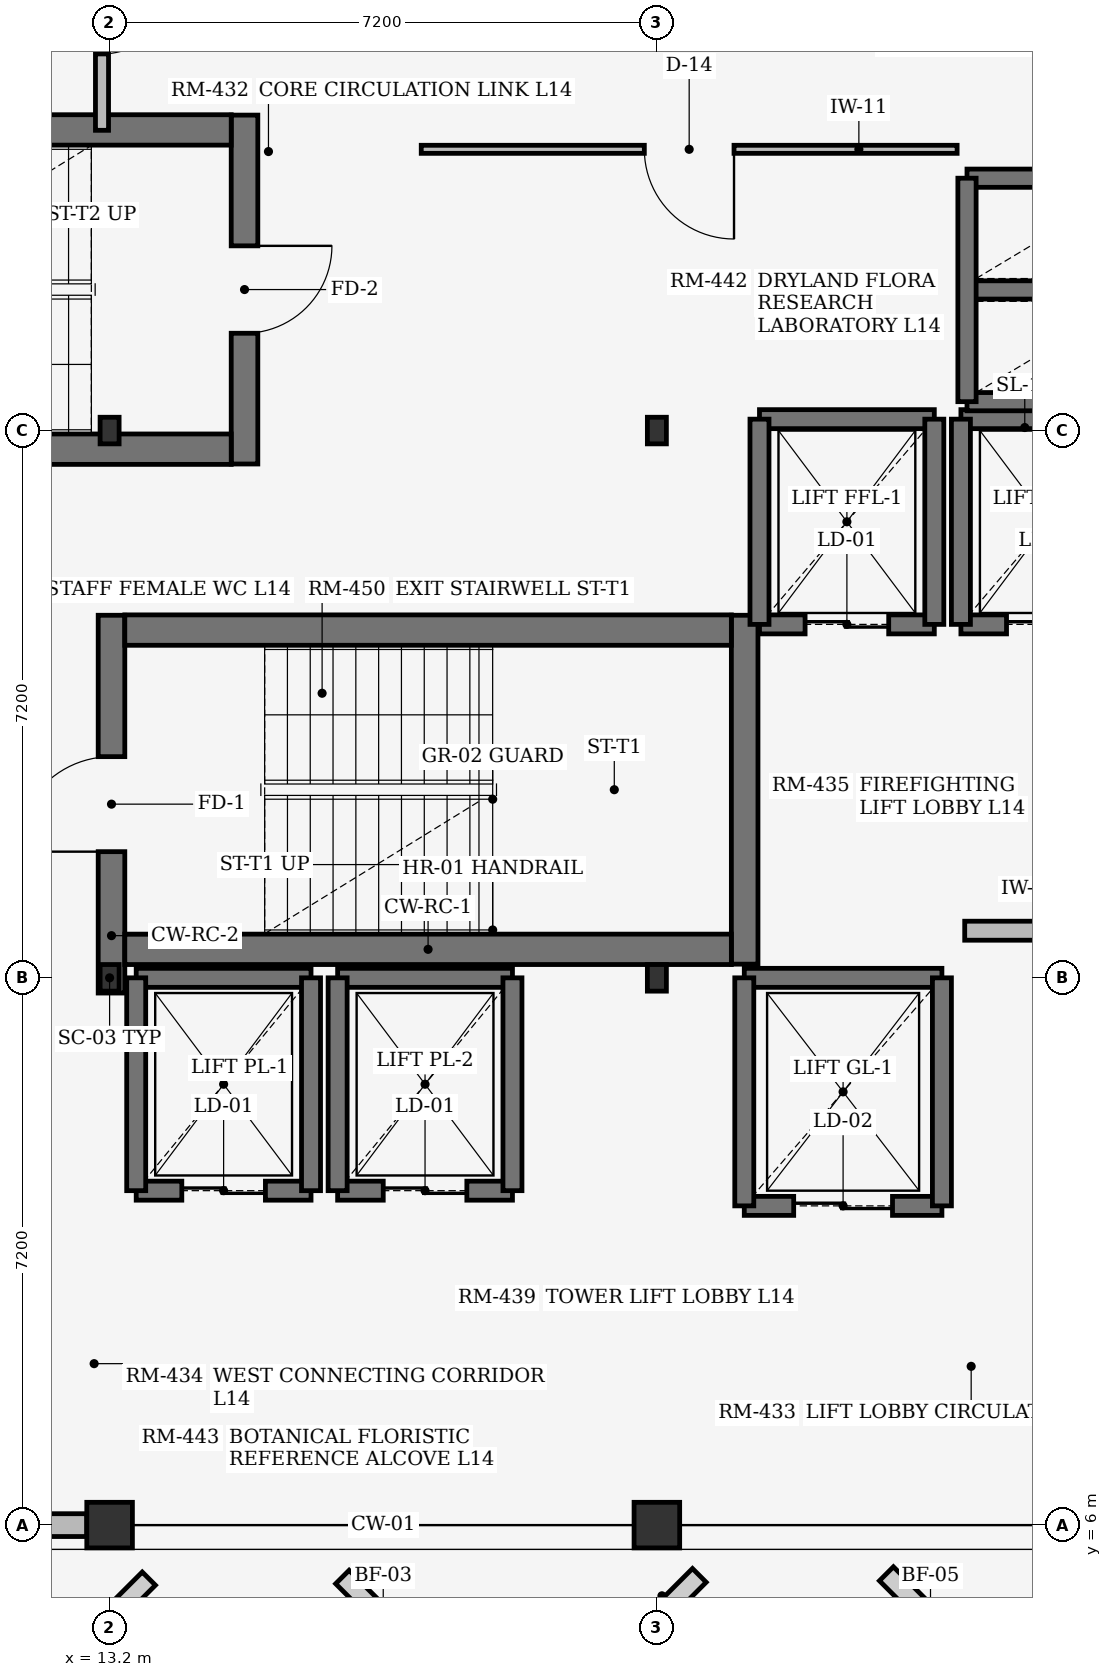
"""IFC4 building model, lengths in metres.
Left out: names, types, materials, properties, quantities, classifications, styles, units other than length and angle.
Written with IfcOpenShell. Run it as: python <this file> out.ifc"""

import sys

from ifc_helpers import new_model, si_unit, direction, frame, frame_2d, origin, origin_2d, place, context, subcontext, project, spatial, rectangle, i_section, extrude, element, fill, save


model = new_model("IFC4")
c1 = context("Model", 3, precision=1e-05, world=origin(), true_north=direction((0.0, 1.0)))
c2 = subcontext(c1, "Body", "Model", "MODEL_VIEW")
j1 = project(units=[si_unit("LENGTHUNIT", "METRE"), si_unit("PLANEANGLEUNIT", "RADIAN")], contexts=[c1])
p1 = place(None, origin())
s1 = spatial("IfcSite", under=j1, at=p1, CompositionType="ELEMENT")
p2 = place(p1, origin())
s2 = spatial("IfcBuilding", under=s1, at=p2, CompositionType="ELEMENT")
p3 = place(p2, frame((0.0, 0.0, 56.1)))
s3 = spatial("IfcBuildingStorey", under=s2, at=p3, CompositionType="ELEMENT", Elevation=56.1)
p4 = place(p3, frame((13.2, 6.0, 0.0), z_axis=(0.0, 0.0, 1.0), x_axis=(1.0, 0.0, 0.0)))
e1 = element("IfcColumn", 1, at=p4, inside=s3, PredefinedType="COLUMN", context=c2, shape_type="SweptSolid", body=[
    extrude(rectangle(XDim=0.6, YDim=0.6, at=origin_2d()), origin(), (0.0, 0.0, 1.0), 3.088),
])
for number, where, z_axis, x_axis in (
    (2, (13.2, 13.2, 0.0), (0.0, 0.0, 1.0), (1.0, 0.0, 0.0)),
    (3, (13.2, 20.4, 0.0), (0.0, 0.0, 1.0), (1.0, 0.0, 0.0)),
):
    element("IfcColumn", number, at=place(p3, frame(where, z_axis=z_axis, x_axis=x_axis)), inside=s3, PredefinedType="COLUMN", context=c2, shape_type="SweptSolid", body=[
        extrude(i_section(OverallWidth=0.25, OverallDepth=0.35, WebThickness=0.01, FlangeThickness=0.012, at=origin_2d()), origin(), (0.0, 0.0, 1.0), 3.088),
    ])
p5 = place(p3, frame((20.4, 6.0, 0.0), z_axis=(0.0, 0.0, 1.0), x_axis=(1.0, 0.0, 0.0)))
e4 = element("IfcColumn", 4, at=p5, inside=s3, PredefinedType="COLUMN", context=c2, shape_type="SweptSolid", body=[
    extrude(rectangle(XDim=0.6, YDim=0.6, at=origin_2d()), origin(), (0.0, 0.0, 1.0), 3.088),
])
for number, where, z_axis, x_axis in (
    (5, (20.4, 13.2, 0.0), (0.0, 0.0, 1.0), (1.0, 0.0, 0.0)),
    (6, (20.4, 20.4, 0.0), (0.0, 0.0, 1.0), (1.0, 0.0, 0.0)),
):
    element("IfcColumn", number, at=place(p3, frame(where, z_axis=z_axis, x_axis=x_axis)), inside=s3, PredefinedType="COLUMN", context=c2, shape_type="SweptSolid", body=[
        extrude(i_section(OverallWidth=0.25, OverallDepth=0.35, WebThickness=0.01, FlangeThickness=0.012, at=origin_2d()), origin(), (0.0, 0.0, 1.0), 3.088),
    ])
p6 = place(p3, frame((6.3, 6.0, 0.0), z_axis=(0.0, 0.0, 1.0), x_axis=(1.0, 0.0, 0.0)))
e7 = element("IfcWall", 7, at=p6, inside=s3, PredefinedType="STANDARD", context=c2, shape_type="SweptSolid", body=[
    extrude(rectangle(XDim=6.6, YDim=0.3, at=frame_2d((3.3, 0.0))), origin(), (0.0, 0.0, 1.0), 2.695),
])
p7 = place(p6, frame((2.625, 0.0, 0.75)))
e8 = element("IfcOpeningElement", 8, at=p7, cuts=e7, PredefinedType="OPENING", context=c2, shape_type="SweptSolid", body=[
    extrude(rectangle(XDim=1.35, YDim=1.5, at=frame_2d((0.675, 0.75))), frame((0.0, 0.16, 0.0), z_axis=(0.0, -1.0, 0.0), x_axis=(1.0, 0.0, 0.0)), (0.0, 0.0, 1.0), 0.32),
])
p8 = place(p3, frame((13.225, 13.0, 0.0), z_axis=(0.0, 0.0, 1.0), x_axis=(0.0, 1.0, 0.0)))
e9 = element("IfcWall", 9, at=p8, inside=s3, PredefinedType="SHEAR", context=c2, shape_type="SweptSolid", body=[
    extrude(rectangle(XDim=4.97, YDim=0.35, at=frame_2d((2.485, 0.0))), origin(), (0.0, 0.0, 1.0), 3.115),
])
p9 = place(p8, frame((1.86, 0.0, 0.0)))
e10 = element("IfcOpeningElement", 10, at=p9, cuts=e9, PredefinedType="OPENING", context=c2, shape_type="SweptSolid", body=[
    extrude(rectangle(XDim=1.25, YDim=2.2, at=frame_2d((0.625, 1.1))), frame((0.0, 0.185, 0.0), z_axis=(0.0, -1.0, 0.0), x_axis=(1.0, 0.0, 0.0)), (0.0, 0.0, 1.0), 0.37),
])
p10 = place(p3, frame((21.555, 13.38, 0.0), z_axis=(0.0, 0.0, 1.0), x_axis=(0.0, 1.0, 0.0)))
e11 = element("IfcWall", 11, at=p10, inside=s3, PredefinedType="SHEAR", context=c2, shape_type="SweptSolid", body=[
    extrude(rectangle(XDim=4.59, YDim=0.35, at=frame_2d((2.295, 0.0))), origin(), (0.0, 0.0, 1.0), 3.115),
])
for number, where, z_axis, x_axis in (
    (12, (13.4, 13.575, 0.0), (0.0, 0.0, 1.0), (1.0, 0.0, 0.0)),
    (13, (13.4, 17.775, 0.0), (0.0, 0.0, 1.0), (1.0, 0.0, 0.0)),
):
    element("IfcWall", number, at=place(p3, frame(where, z_axis=z_axis, x_axis=x_axis)), inside=s3, PredefinedType="SHEAR", context=c2, shape_type="SweptSolid", body=[
        extrude(rectangle(XDim=7.98, YDim=0.4, at=frame_2d((3.99, 0.0))), origin(), (0.0, 0.0, 1.0), 3.115),
    ])
p11 = place(p3, frame((14.975, 24.55, 0.0), z_axis=(0.0, 0.0, 1.0), x_axis=(0.0, -1.0, 0.0)))
e14 = element("IfcWall", 14, at=p11, inside=s3, PredefinedType="SHEAR", context=c2, shape_type="SweptSolid", body=[
    extrude(rectangle(XDim=4.59, YDim=0.35, at=frame_2d((2.295, 0.0))), origin(), (0.0, 0.0, 1.0), 3.115),
])
p12 = place(p11, frame((1.72, 0.0, 0.0)))
e15 = element("IfcOpeningElement", 15, at=p12, cuts=e14, PredefinedType="OPENING", context=c2, shape_type="SweptSolid", body=[
    extrude(rectangle(XDim=1.15, YDim=2.2, at=frame_2d((0.575, 1.1))), frame((0.0, 0.185, 0.0), z_axis=(0.0, -1.0, 0.0), x_axis=(1.0, 0.0, 0.0)), (0.0, 0.0, 1.0), 0.37),
])
for number, where, z_axis, x_axis in (
    (16, (14.8, 24.355, 0.0), (0.0, 0.0, 1.0), (-1.0, 0.0, 0.0)),
    (17, (14.8, 20.155, 0.0), (0.0, 0.0, 1.0), (-1.0, 0.0, 0.0)),
):
    element("IfcWall", number, at=place(p3, frame(where, z_axis=z_axis, x_axis=x_axis)), inside=s3, PredefinedType="SHEAR", context=c2, shape_type="SweptSolid", body=[
        extrude(rectangle(XDim=7.98, YDim=0.4, at=frame_2d((3.99, 0.0))), origin(), (0.0, 0.0, 1.0), 3.115),
    ])
p13 = place(p3, frame((21.75, 17.85, 0.0), z_axis=(0.0, 0.0, 1.0), x_axis=(1.0, 0.0, 0.0)))
e18 = element("IfcWall", 18, at=p13, inside=s3, PredefinedType="SHEAR", context=c2, shape_type="SweptSolid", body=[
    extrude(rectangle(XDim=2.3, YDim=0.25, at=frame_2d((1.15, 0.0))), origin(), (0.0, 0.0, 1.0), 3.115),
])
p14 = place(p13, frame((0.6, 0.0, 0.0)))
e19 = element("IfcOpeningElement", 19, at=p14, cuts=e18, PredefinedType="OPENING", context=c2, shape_type="SweptSolid", body=[
    extrude(rectangle(XDim=1.1, YDim=2.2, at=frame_2d((0.55, 1.1))), frame((0.0, 0.135, 0.0), z_axis=(0.0, -1.0, 0.0), x_axis=(1.0, 0.0, 0.0)), (0.0, 0.0, 1.0), 0.27),
])
p15 = place(p3, frame((21.75, 20.55, 0.0), z_axis=(0.0, 0.0, 1.0), x_axis=(1.0, 0.0, 0.0)))
e20 = element("IfcWall", 20, at=p15, inside=s3, PredefinedType="SHEAR", context=c2, shape_type="SweptSolid", body=[
    extrude(rectangle(XDim=2.3, YDim=0.25, at=frame_2d((1.15, 0.0))), origin(), (0.0, 0.0, 1.0), 3.115),
])
for number, where, z_axis, x_axis in (
    (21, (21.75, 17.85, 0.0), (0.0, 0.0, 1.0), (0.0, 1.0, 0.0)),
    (22, (24.05, 17.85, 0.0), (0.0, 0.0, 1.0), (0.0, 1.0, 0.0)),
):
    element("IfcWall", number, at=place(p3, frame(where, z_axis=z_axis, x_axis=x_axis)), inside=s3, PredefinedType="SHEAR", context=c2, shape_type="SweptSolid", body=[
        extrude(rectangle(XDim=2.7, YDim=0.25, at=frame_2d((1.35, 0.0))), origin(), (0.0, 0.0, 1.0), 3.115),
    ])
p16 = place(p3, frame((24.4, 17.85, 0.0), z_axis=(0.0, 0.0, 1.0), x_axis=(1.0, 0.0, 0.0)))
e23 = element("IfcWall", 23, at=p16, inside=s3, PredefinedType="SHEAR", context=c2, shape_type="SweptSolid", body=[
    extrude(rectangle(XDim=2.3, YDim=0.25, at=frame_2d((1.15, 0.0))), origin(), (0.0, 0.0, 1.0), 3.115),
])
p17 = place(p16, frame((0.6, 0.0, 0.0)))
e24 = element("IfcOpeningElement", 24, at=p17, cuts=e23, PredefinedType="OPENING", context=c2, shape_type="SweptSolid", body=[
    extrude(rectangle(XDim=1.1, YDim=2.2, at=frame_2d((0.55, 1.1))), frame((0.0, 0.135, 0.0), z_axis=(0.0, -1.0, 0.0), x_axis=(1.0, 0.0, 0.0)), (0.0, 0.0, 1.0), 0.27),
])
p18 = place(p3, frame((24.4, 20.55, 0.0), z_axis=(0.0, 0.0, 1.0), x_axis=(1.0, 0.0, 0.0)))
e25 = element("IfcWall", 25, at=p18, inside=s3, PredefinedType="SHEAR", context=c2, shape_type="SweptSolid", body=[
    extrude(rectangle(XDim=2.3, YDim=0.25, at=frame_2d((1.15, 0.0))), origin(), (0.0, 0.0, 1.0), 3.115),
])
p19 = place(p3, frame((24.4, 17.85, 0.0), z_axis=(0.0, 0.0, 1.0), x_axis=(0.0, 1.0, 0.0)))
e26 = element("IfcWall", 26, at=p19, inside=s3, PredefinedType="SHEAR", context=c2, shape_type="SweptSolid", body=[
    extrude(rectangle(XDim=2.7, YDim=0.25, at=frame_2d((1.35, 0.0))), origin(), (0.0, 0.0, 1.0), 3.115),
])
p20 = place(p3, frame((13.55, 10.4, 0.0), z_axis=(0.0, 0.0, 1.0), x_axis=(1.0, 0.0, 0.0)))
e27 = element("IfcWall", 27, at=p20, inside=s3, PredefinedType="SHEAR", context=c2, shape_type="SweptSolid", body=[
    extrude(rectangle(XDim=2.3, YDim=0.25, at=frame_2d((1.15, 0.0))), origin(), (0.0, 0.0, 1.0), 3.115),
])
p21 = place(p20, frame((0.6, 0.0, 0.0)))
e28 = element("IfcOpeningElement", 28, at=p21, cuts=e27, PredefinedType="OPENING", context=c2, shape_type="SweptSolid", body=[
    extrude(rectangle(XDim=1.1, YDim=2.2, at=frame_2d((0.55, 1.1))), frame((0.0, 0.135, 0.0), z_axis=(0.0, -1.0, 0.0), x_axis=(1.0, 0.0, 0.0)), (0.0, 0.0, 1.0), 0.27),
])
p22 = place(p3, frame((13.55, 13.2, 0.0), z_axis=(0.0, 0.0, 1.0), x_axis=(1.0, 0.0, 0.0)))
e29 = element("IfcWall", 29, at=p22, inside=s3, PredefinedType="SHEAR", context=c2, shape_type="SweptSolid", body=[
    extrude(rectangle(XDim=2.3, YDim=0.25, at=frame_2d((1.15, 0.0))), origin(), (0.0, 0.0, 1.0), 3.115),
])
for number, where, z_axis, x_axis in (
    (30, (13.55, 10.4, 0.0), (0.0, 0.0, 1.0), (0.0, 1.0, 0.0)),
    (31, (15.85, 10.4, 0.0), (0.0, 0.0, 1.0), (0.0, 1.0, 0.0)),
):
    element("IfcWall", number, at=place(p3, frame(where, z_axis=z_axis, x_axis=x_axis)), inside=s3, PredefinedType="SHEAR", context=c2, shape_type="SweptSolid", body=[
        extrude(rectangle(XDim=2.8, YDim=0.25, at=frame_2d((1.4, 0.0))), origin(), (0.0, 0.0, 1.0), 3.115),
    ])
p23 = place(p3, frame((16.2, 10.4, 0.0), z_axis=(0.0, 0.0, 1.0), x_axis=(1.0, 0.0, 0.0)))
e32 = element("IfcWall", 32, at=p23, inside=s3, PredefinedType="SHEAR", context=c2, shape_type="SweptSolid", body=[
    extrude(rectangle(XDim=2.3, YDim=0.25, at=frame_2d((1.15, 0.0))), origin(), (0.0, 0.0, 1.0), 3.115),
])
p24 = place(p23, frame((0.6, 0.0, 0.0)))
e33 = element("IfcOpeningElement", 33, at=p24, cuts=e32, PredefinedType="OPENING", context=c2, shape_type="SweptSolid", body=[
    extrude(rectangle(XDim=1.1, YDim=2.2, at=frame_2d((0.55, 1.1))), frame((0.0, 0.135, 0.0), z_axis=(0.0, -1.0, 0.0), x_axis=(1.0, 0.0, 0.0)), (0.0, 0.0, 1.0), 0.27),
])
p25 = place(p3, frame((16.2, 13.2, 0.0), z_axis=(0.0, 0.0, 1.0), x_axis=(1.0, 0.0, 0.0)))
e34 = element("IfcWall", 34, at=p25, inside=s3, PredefinedType="SHEAR", context=c2, shape_type="SweptSolid", body=[
    extrude(rectangle(XDim=2.3, YDim=0.25, at=frame_2d((1.15, 0.0))), origin(), (0.0, 0.0, 1.0), 3.115),
])
for number, where, z_axis, x_axis in (
    (35, (16.2, 10.4, 0.0), (0.0, 0.0, 1.0), (0.0, 1.0, 0.0)),
    (36, (18.5, 10.4, 0.0), (0.0, 0.0, 1.0), (0.0, 1.0, 0.0)),
):
    element("IfcWall", number, at=place(p3, frame(where, z_axis=z_axis, x_axis=x_axis)), inside=s3, PredefinedType="SHEAR", context=c2, shape_type="SweptSolid", body=[
        extrude(rectangle(XDim=2.8, YDim=0.25, at=frame_2d((1.4, 0.0))), origin(), (0.0, 0.0, 1.0), 3.115),
    ])
p26 = place(p3, frame((21.55, 10.2, 0.0), z_axis=(0.0, 0.0, 1.0), x_axis=(1.0, 0.0, 0.0)))
e37 = element("IfcWall", 37, at=p26, inside=s3, PredefinedType="SHEAR", context=c2, shape_type="SweptSolid", body=[
    extrude(rectangle(XDim=2.6, YDim=0.25, at=frame_2d((1.3, 0.0))), origin(), (0.0, 0.0, 1.0), 3.115),
])
p27 = place(p26, frame((0.65, 0.0, 0.0)))
e38 = element("IfcOpeningElement", 38, at=p27, cuts=e37, PredefinedType="OPENING", context=c2, shape_type="SweptSolid", body=[
    extrude(rectangle(XDim=1.3, YDim=2.25, at=frame_2d((0.65, 1.125))), frame((0.0, 0.135, 0.0), z_axis=(0.0, -1.0, 0.0), x_axis=(1.0, 0.0, 0.0)), (0.0, 0.0, 1.0), 0.27),
])
p28 = place(p3, frame((21.55, 13.2, 0.0), z_axis=(0.0, 0.0, 1.0), x_axis=(1.0, 0.0, 0.0)))
e39 = element("IfcWall", 39, at=p28, inside=s3, PredefinedType="SHEAR", context=c2, shape_type="SweptSolid", body=[
    extrude(rectangle(XDim=2.6, YDim=0.25, at=frame_2d((1.3, 0.0))), origin(), (0.0, 0.0, 1.0), 3.115),
])
for number, where, z_axis, x_axis in (
    (40, (21.55, 10.2, 0.0), (0.0, 0.0, 1.0), (0.0, 1.0, 0.0)),
    (41, (24.15, 10.2, 0.0), (0.0, 0.0, 1.0), (0.0, 1.0, 0.0)),
):
    element("IfcWall", number, at=place(p3, frame(where, z_axis=z_axis, x_axis=x_axis)), inside=s3, PredefinedType="SHEAR", context=c2, shape_type="SweptSolid", body=[
        extrude(rectangle(XDim=3.0, YDim=0.25, at=frame_2d((1.5, 0.0))), origin(), (0.0, 0.0, 1.0), 3.115),
    ])
for number, where, z_axis, x_axis in (
    (42, (24.48, 20.78, 0.0), (0.0, 0.0, 1.0), (1.0, 0.0, 0.0)),
    (43, (24.48, 22.25, 0.0), (0.0, 0.0, 1.0), (1.0, 0.0, 0.0)),
    (44, (24.48, 23.72, 0.0), (0.0, 0.0, 1.0), (1.0, 0.0, 0.0)),
):
    element("IfcWall", number, at=place(p3, frame(where, z_axis=z_axis, x_axis=x_axis)), inside=s3, PredefinedType="SHEAR", context=c2, shape_type="SweptSolid", body=[
        extrude(rectangle(XDim=2.24, YDim=0.24, at=frame_2d((1.12, 0.0))), origin(), (0.0, 0.0, 1.0), 3.115),
    ])
p29 = place(p3, frame((24.48, 20.78, 0.0), z_axis=(0.0, 0.0, 1.0), x_axis=(0.0, 1.0, 0.0)))
e45 = element("IfcWall", 45, at=p29, inside=s3, PredefinedType="SHEAR", context=c2, shape_type="SweptSolid", body=[
    extrude(rectangle(XDim=2.94, YDim=0.24, at=frame_2d((1.47, 0.0))), origin(), (0.0, 0.0, 1.0), 3.115),
])
p30 = place(p3, frame((24.45, 13.82, 0.0), z_axis=(0.0, 0.0, 1.0), x_axis=(1.0, 0.0, 0.0)))
e46 = element("IfcWall", 46, at=p30, inside=s3, PredefinedType="SOLIDWALL", context=c2, shape_type="SweptSolid", body=[
    extrude(rectangle(XDim=2.0, YDim=0.25, at=frame_2d((1.0, 0.0))), origin(), (0.0, 0.0, 1.0), 3.095),
])
p31 = place(p3, frame((17.3, 24.1, 0.0), z_axis=(0.0, 0.0, 1.0), x_axis=(1.0, 0.0, 0.0)))
e47 = element("IfcWall", 47, at=p31, inside=s3, PredefinedType="PARTITIONING", context=c2, shape_type="SweptSolid", body=[
    extrude(rectangle(XDim=7.05, YDim=0.106, at=frame_2d((3.525, 0.0))), origin(), (0.0, 0.0, 1.0), 3.095),
])
p32 = place(p31, frame((2.935, 0.0, 0.0)))
e48 = element("IfcOpeningElement", 48, at=p32, cuts=e47, PredefinedType="OPENING", context=c2, shape_type="SweptSolid", body=[
    extrude(rectangle(XDim=1.18, YDim=2.1, at=frame_2d((0.59, 1.05))), frame((0.0, 0.063, 0.0), z_axis=(0.0, -1.0, 0.0), x_axis=(1.0, 0.0, 0.0)), (0.0, 0.0, 1.0), 0.126),
])
p33 = place(p3, frame((13.1, 24.35, 0.0), z_axis=(0.0, 0.0, 1.0), x_axis=(0.0, 1.0, 0.0)))
e49 = element("IfcWall", 49, at=p33, inside=s3, PredefinedType="PARTITIONING", context=c2, shape_type="SweptSolid", body=[
    extrude(rectangle(XDim=2.95, YDim=0.172, at=frame_2d((1.475, 0.0))), origin(), (0.0, 0.0, 1.0), 2.678),
])
p34 = place(p33, frame((1.005, 0.0, 0.0)))
e50 = element("IfcOpeningElement", 50, at=p34, cuts=e49, PredefinedType="OPENING", context=c2, shape_type="SweptSolid", body=[
    extrude(rectangle(XDim=0.94, YDim=2.18, at=frame_2d((0.47, 1.09))), frame((0.0, 0.096, 0.0), z_axis=(0.0, -1.0, 0.0), x_axis=(1.0, 0.0, 0.0)), (0.0, 0.0, 1.0), 0.192),
])
p35 = place(p9, origin())
e51 = element("IfcDoor", 51, at=p35, inside=s3, OperationType="SINGLE_SWING_LEFT", PredefinedType="DOOR", context=c2, shape_type="SweptSolid", body=[
    extrude(rectangle(XDim=1.25, YDim=2.2, at=frame_2d((0.625, 1.1))), frame((0.0, 0.025, 0.0), z_axis=(0.0, -1.0, 0.0), x_axis=(1.0, 0.0, 0.0)), (0.0, 0.0, 1.0), 0.05),
])
fill(e10, e51)
p36 = place(p12, origin())
e52 = element("IfcDoor", 52, at=p36, inside=s3, OperationType="SINGLE_SWING_LEFT", PredefinedType="DOOR", context=c2, shape_type="SweptSolid", body=[
    extrude(rectangle(XDim=1.15, YDim=2.2, at=frame_2d((0.575, 1.1))), frame((0.0, 0.025, 0.0), z_axis=(0.0, -1.0, 0.0), x_axis=(1.0, 0.0, 0.0)), (0.0, 0.0, 1.0), 0.05),
])
fill(e15, e52)
p37 = place(p14, origin())
e53 = element("IfcDoor", 53, at=p37, inside=s3, OperationType="DOUBLE_DOOR_SLIDING", PredefinedType="DOOR", context=c2, shape_type="SweptSolid", body=[
    extrude(rectangle(XDim=1.1, YDim=2.2, at=frame_2d((0.55, 1.1))), frame((0.0, 0.025, 0.0), z_axis=(0.0, -1.0, 0.0), x_axis=(1.0, 0.0, 0.0)), (0.0, 0.0, 1.0), 0.05),
])
fill(e19, e53)
p38 = place(p17, origin())
e54 = element("IfcDoor", 54, at=p38, inside=s3, OperationType="DOUBLE_DOOR_SLIDING", PredefinedType="DOOR", context=c2, shape_type="SweptSolid", body=[
    extrude(rectangle(XDim=1.1, YDim=2.2, at=frame_2d((0.55, 1.1))), frame((0.0, 0.025, 0.0), z_axis=(0.0, -1.0, 0.0), x_axis=(1.0, 0.0, 0.0)), (0.0, 0.0, 1.0), 0.05),
])
fill(e24, e54)
p39 = place(p21, origin())
e55 = element("IfcDoor", 55, at=p39, inside=s3, OperationType="DOUBLE_DOOR_SLIDING", PredefinedType="DOOR", context=c2, shape_type="SweptSolid", body=[
    extrude(rectangle(XDim=1.1, YDim=2.2, at=frame_2d((0.55, 1.1))), frame((0.0, 0.025, 0.0), z_axis=(0.0, -1.0, 0.0), x_axis=(1.0, 0.0, 0.0)), (0.0, 0.0, 1.0), 0.05),
])
fill(e28, e55)
p40 = place(p24, origin())
e56 = element("IfcDoor", 56, at=p40, inside=s3, OperationType="DOUBLE_DOOR_SLIDING", PredefinedType="DOOR", context=c2, shape_type="SweptSolid", body=[
    extrude(rectangle(XDim=1.1, YDim=2.2, at=frame_2d((0.55, 1.1))), frame((0.0, 0.025, 0.0), z_axis=(0.0, -1.0, 0.0), x_axis=(1.0, 0.0, 0.0)), (0.0, 0.0, 1.0), 0.05),
])
fill(e33, e56)
p41 = place(p27, origin())
e57 = element("IfcDoor", 57, at=p41, inside=s3, OperationType="DOUBLE_DOOR_SLIDING", PredefinedType="DOOR", context=c2, shape_type="SweptSolid", body=[
    extrude(rectangle(XDim=1.3, YDim=2.25, at=frame_2d((0.65, 1.125))), frame((0.0, 0.025, 0.0), z_axis=(0.0, -1.0, 0.0), x_axis=(1.0, 0.0, 0.0)), (0.0, 0.0, 1.0), 0.05),
])
fill(e38, e57)
p42 = place(p32, origin())
e58 = element("IfcDoor", 58, at=p42, inside=s3, OperationType="SINGLE_SWING_RIGHT", PredefinedType="DOOR", context=c2, shape_type="SweptSolid", body=[
    extrude(rectangle(XDim=1.18, YDim=2.1, at=frame_2d((0.59, 1.05))), frame((0.0, 0.025, 0.0), z_axis=(0.0, -1.0, 0.0), x_axis=(1.0, 0.0, 0.0)), (0.0, 0.0, 1.0), 0.05),
])
fill(e48, e58)
p43 = place(p34, origin())
e59 = element("IfcDoor", 59, at=p43, inside=s3, OperationType="SINGLE_SWING_RIGHT", PredefinedType="DOOR", context=c2, shape_type="SweptSolid", body=[
    extrude(rectangle(XDim=0.94, YDim=2.18, at=frame_2d((0.47, 1.09))), frame((0.0, 0.025, 0.0), z_axis=(0.0, -1.0, 0.0), x_axis=(1.0, 0.0, 0.0)), (0.0, 0.0, 1.0), 0.05),
])
fill(e50, e59)
save(model, sys.argv[1])
